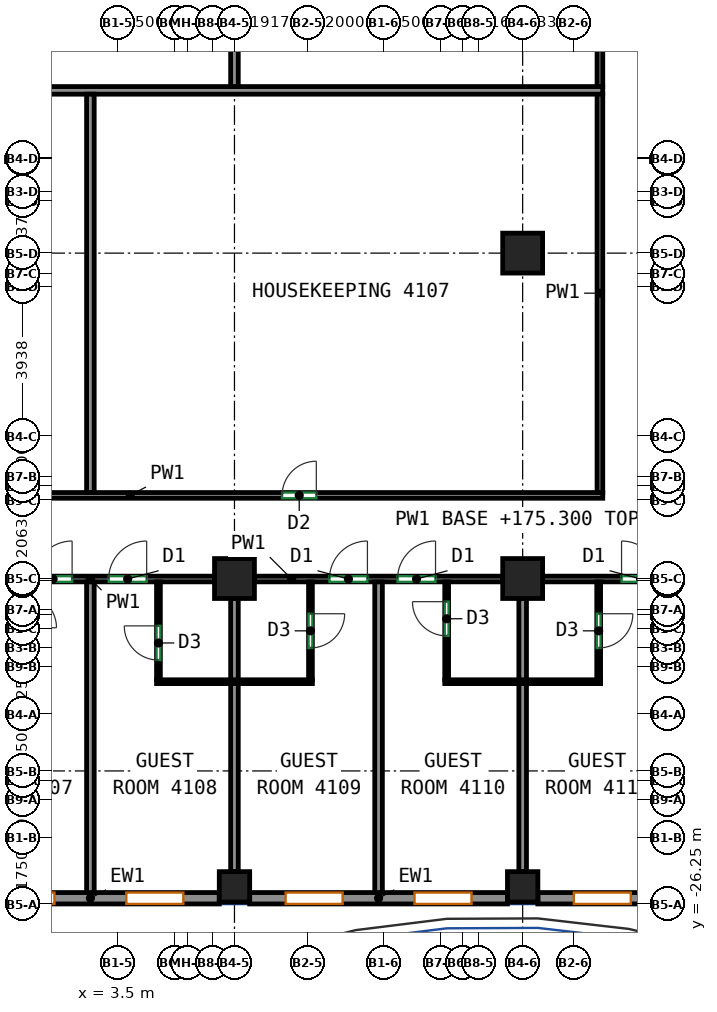
"""IFC4 building model, lengths in metres.
Left out: names, types, materials, properties, quantities, classifications, styles, units other than length and angle.
Written with IfcOpenShell. Run it as: python <this file> out.ifc"""

import sys

from ifc_helpers import new_model, si_unit, direction, frame, frame_2d, origin, origin_2d, place, context, subcontext, project, spatial, rectangle, extrude, source, transform, mapped, element, fill, save


model = new_model("IFC4")
c1 = context("Model", 3, precision=1e-05, world=origin(), true_north=direction((0.0, 1.0)))
c2 = subcontext(c1, "Body", "Model", "MODEL_VIEW")
j1 = project(units=[si_unit("LENGTHUNIT", "METRE"), si_unit("PLANEANGLEUNIT", "RADIAN")], contexts=[c1])
p1 = place(None, origin())
s1 = spatial("IfcSite", under=j1, at=p1, CompositionType="ELEMENT")
p2 = place(p1, origin())
s2 = spatial("IfcBuilding", under=s1, at=p2, CompositionType="ELEMENT")
p3 = place(p2, frame((0.0, 0.0, 175.3)))
s3 = spatial("IfcBuildingStorey", under=s2, at=p3, CompositionType="ELEMENT", Elevation=175.3)
m1 = source(origin(), c2, "Body", "SweptSolid", [
    extrude(rectangle(XDim=0.8, YDim=0.8, at=origin_2d()), origin(), (0.0, 0.0, 1.0), 3.12),
])
p4 = place(p3, frame((6.583, -25.8, 0.0), z_axis=(0.0, 0.0, 1.0), x_axis=(1.0, 0.0, 0.0)))
e1 = element("IfcColumn", 1, at=p4, inside=s3, PredefinedType="COLUMN", context=c2, shape_type="MappedRepresentation", body=[
    mapped(m1, transform((0.0, 0.0, 0.0))),
])
m2 = source(origin(), c2, "Body", "SweptSolid", [
    extrude(rectangle(XDim=1.05, YDim=1.05, at=origin_2d()), origin(), (0.0, 0.0, 1.0), 3.12),
])
p5 = place(p3, frame((6.583, -17.688, 0.0), z_axis=(0.0, 0.0, 1.0), x_axis=(1.0, 0.0, 0.0)))
e2 = element("IfcColumn", 2, at=p5, inside=s3, PredefinedType="COLUMN", context=c2, shape_type="MappedRepresentation", body=[
    mapped(m2, transform((0.0, 0.0, 0.0))),
])
p6 = place(p3, frame((14.167, -25.8, 0.0), z_axis=(0.0, 0.0, 1.0), x_axis=(1.0, 0.0, 0.0)))
e3 = element("IfcColumn", 3, at=p6, inside=s3, PredefinedType="COLUMN", context=c2, shape_type="MappedRepresentation", body=[
    mapped(m1, transform((0.0, 0.0, 0.0))),
])
for number, where, z_axis, x_axis in (
    (4, (14.167, -17.688, 0.0), (0.0, 0.0, 1.0), (1.0, 0.0, 0.0)),
    (5, (14.167, -9.125, 0.0), (0.0, 0.0, 1.0), (1.0, 0.0, 0.0)),
):
    element("IfcColumn", number, at=place(p3, frame(where, z_axis=z_axis, x_axis=x_axis)), inside=s3, PredefinedType="COLUMN", context=c2, shape_type="MappedRepresentation", body=[
        mapped(m2, transform((0.0, 0.0, 0.0))),
    ])
m3 = source(origin(), c2, "Body", "SweptSolid", [
    extrude(rectangle(XDim=6.783, YDim=0.3, at=frame_2d((3.392, 0.0))), origin(), (0.0, 0.0, 1.0), 3.12),
])
p7 = place(p3, frame((-0.6, -26.1, 0.0), z_axis=(0.0, 0.0, 1.0), x_axis=(1.0, 0.0, 0.0)))
e6 = element("IfcWall", 6, at=p7, inside=s3, PredefinedType="SOLIDWALL", context=c2, shape_type="MappedRepresentation", body=[
    mapped(m3, transform((0.0, 0.0, 0.0))),
])
p8 = place(p7, frame((0.946, 0.0, 0.85)))
e7 = element("IfcOpeningElement", 7, at=p8, cuts=e6, PredefinedType="OPENING", context=c2, shape_type="SweptSolid", body=[
    extrude(rectangle(XDim=1.5, YDim=1.95, at=frame_2d((0.75, 0.975))), frame((0.0, 0.16, 0.0), z_axis=(0.0, -1.0, 0.0), x_axis=(1.0, 0.0, 0.0)), (0.0, 0.0, 1.0), 0.32),
])
p9 = place(p7, frame((4.337, 0.0, 0.85)))
e8 = element("IfcOpeningElement", 8, at=p9, cuts=e6, PredefinedType="OPENING", context=c2, shape_type="SweptSolid", body=[
    extrude(rectangle(XDim=1.5, YDim=1.95, at=frame_2d((0.75, 0.975))), frame((0.0, 0.16, 0.0), z_axis=(0.0, -1.0, 0.0), x_axis=(1.0, 0.0, 0.0)), (0.0, 0.0, 1.0), 0.32),
])
m4 = source(origin(), c2, "Body", "SweptSolid", [
    extrude(rectangle(XDim=6.783, YDim=0.3, at=frame_2d((3.392, 0.0))), origin(), (0.0, 0.0, 1.0), 3.12),
])
p10 = place(p3, frame((6.983, -26.1, 0.0), z_axis=(0.0, 0.0, 1.0), x_axis=(1.0, 0.0, 0.0)))
e9 = element("IfcWall", 9, at=p10, inside=s3, PredefinedType="SOLIDWALL", context=c2, shape_type="MappedRepresentation", body=[
    mapped(m4, transform((0.0, 0.0, 0.0))),
])
p11 = place(p10, frame((0.946, 0.0, 0.85)))
e10 = element("IfcOpeningElement", 10, at=p11, cuts=e9, PredefinedType="OPENING", context=c2, shape_type="SweptSolid", body=[
    extrude(rectangle(XDim=1.5, YDim=1.95, at=frame_2d((0.75, 0.975))), frame((0.0, 0.16, 0.0), z_axis=(0.0, -1.0, 0.0), x_axis=(1.0, 0.0, 0.0)), (0.0, 0.0, 1.0), 0.32),
])
p12 = place(p10, frame((4.338, 0.0, 0.85)))
e11 = element("IfcOpeningElement", 11, at=p12, cuts=e9, PredefinedType="OPENING", context=c2, shape_type="SweptSolid", body=[
    extrude(rectangle(XDim=1.5, YDim=1.95, at=frame_2d((0.75, 0.975))), frame((0.0, 0.16, 0.0), z_axis=(0.0, -1.0, 0.0), x_axis=(1.0, 0.0, 0.0)), (0.0, 0.0, 1.0), 0.32),
])
p13 = place(p3, frame((14.567, -26.1, 0.0), z_axis=(0.0, 0.0, 1.0), x_axis=(1.0, 0.0, 0.0)))
e12 = element("IfcWall", 12, at=p13, inside=s3, PredefinedType="SOLIDWALL", context=c2, shape_type="MappedRepresentation", body=[
    mapped(m3, transform((0.0, 0.0, 0.0))),
])
p14 = place(p13, frame((0.946, 0.0, 0.85)))
e13 = element("IfcOpeningElement", 13, at=p14, cuts=e12, PredefinedType="OPENING", context=c2, shape_type="SweptSolid", body=[
    extrude(rectangle(XDim=1.5, YDim=1.95, at=frame_2d((0.75, 0.975))), frame((0.0, 0.16, 0.0), z_axis=(0.0, -1.0, 0.0), x_axis=(1.0, 0.0, 0.0)), (0.0, 0.0, 1.0), 0.32),
])
p15 = place(p13, frame((4.337, 0.0, 0.85)))
e14 = element("IfcOpeningElement", 14, at=p15, cuts=e12, PredefinedType="OPENING", context=c2, shape_type="SweptSolid", body=[
    extrude(rectangle(XDim=1.5, YDim=1.95, at=frame_2d((0.75, 0.975))), frame((0.0, 0.16, 0.0), z_axis=(0.0, -1.0, 0.0), x_axis=(1.0, 0.0, 0.0)), (0.0, 0.0, 1.0), 0.32),
])
p16 = place(p3, frame((-0.475, -17.7, 0.0), z_axis=(0.0, 0.0, 1.0), x_axis=(1.0, 0.0, 0.0)))
e15 = element("IfcWall", 15, at=p16, inside=s3, PredefinedType="PARTITIONING", context=c2, shape_type="SweptSolid", body=[
    extrude(rectangle(XDim=6.533, YDim=0.15, at=frame_2d((3.267, 0.0))), origin(), (0.0, 0.0, 1.0), 3.12),
])
p17 = place(p16, frame((1.786, 0.0, 0.0)))
e16 = element("IfcOpeningElement", 16, at=p17, cuts=e15, PredefinedType="OPENING", context=c2, shape_type="SweptSolid", body=[
    extrude(rectangle(XDim=1.0, YDim=2.1, at=frame_2d((0.5, 1.05))), frame((0.0, 0.085, 0.0), z_axis=(0.0, -1.0, 0.0), x_axis=(1.0, 0.0, 0.0)), (0.0, 0.0, 1.0), 0.17),
])
p18 = place(p16, frame((3.748, 0.0, 0.0)))
e17 = element("IfcOpeningElement", 17, at=p18, cuts=e15, PredefinedType="OPENING", context=c2, shape_type="SweptSolid", body=[
    extrude(rectangle(XDim=1.0, YDim=2.1, at=frame_2d((0.5, 1.05))), frame((0.0, 0.085, 0.0), z_axis=(0.0, -1.0, 0.0), x_axis=(1.0, 0.0, 0.0)), (0.0, 0.0, 1.0), 0.17),
])
p19 = place(p3, frame((7.108, -17.7, 0.0), z_axis=(0.0, 0.0, 1.0), x_axis=(1.0, 0.0, 0.0)))
e18 = element("IfcWall", 18, at=p19, inside=s3, PredefinedType="PARTITIONING", context=c2, shape_type="SweptSolid", body=[
    extrude(rectangle(XDim=6.534, YDim=0.15, at=frame_2d((3.267, 0.0))), origin(), (0.0, 0.0, 1.0), 3.12),
])
p20 = place(p19, frame((1.974, 0.0, 0.0)))
e19 = element("IfcOpeningElement", 19, at=p20, cuts=e18, PredefinedType="OPENING", context=c2, shape_type="SweptSolid", body=[
    extrude(rectangle(XDim=1.0, YDim=2.1, at=frame_2d((0.5, 1.05))), frame((0.0, 0.085, 0.0), z_axis=(0.0, -1.0, 0.0), x_axis=(1.0, 0.0, 0.0)), (0.0, 0.0, 1.0), 0.17),
])
p21 = place(p19, frame((3.766, 0.0, 0.0)))
e20 = element("IfcOpeningElement", 20, at=p21, cuts=e18, PredefinedType="OPENING", context=c2, shape_type="SweptSolid", body=[
    extrude(rectangle(XDim=1.0, YDim=2.1, at=frame_2d((0.5, 1.05))), frame((0.0, 0.085, 0.0), z_axis=(0.0, -1.0, 0.0), x_axis=(1.0, 0.0, 0.0)), (0.0, 0.0, 1.0), 0.17),
])
p22 = place(p3, frame((14.692, -17.7, 0.0), z_axis=(0.0, 0.0, 1.0), x_axis=(1.0, 0.0, 0.0)))
e21 = element("IfcWall", 21, at=p22, inside=s3, PredefinedType="PARTITIONING", context=c2, shape_type="SweptSolid", body=[
    extrude(rectangle(XDim=7.058, YDim=0.15, at=frame_2d((3.529, 0.0))), origin(), (0.0, 0.0, 1.0), 2.52),
])
p23 = place(p22, frame((2.077, 0.0, 0.0)))
e22 = element("IfcOpeningElement", 22, at=p23, cuts=e21, PredefinedType="OPENING", context=c2, shape_type="SweptSolid", body=[
    extrude(rectangle(XDim=1.0, YDim=2.1, at=frame_2d((0.5, 1.05))), frame((0.0, 0.085, 0.0), z_axis=(0.0, -1.0, 0.0), x_axis=(1.0, 0.0, 0.0)), (0.0, 0.0, 1.0), 0.17),
])
p24 = place(p22, frame((5.657, 0.0, 0.0)))
e23 = element("IfcOpeningElement", 23, at=p24, cuts=e21, PredefinedType="OPENING", context=c2, shape_type="SweptSolid", body=[
    extrude(rectangle(XDim=1.0, YDim=2.1, at=frame_2d((0.5, 1.05))), frame((0.0, 0.085, 0.0), z_axis=(0.0, -1.0, 0.0), x_axis=(1.0, 0.0, 0.0)), (0.0, 0.0, 1.0), 0.17),
])
p25 = place(p3, frame((16.2, -4.753, 0.0), z_axis=(0.0, 0.0, 1.0), x_axis=(0.0, 1.0, 0.0)))
e24 = element("IfcWall", 24, at=p25, inside=s3, PredefinedType="PARTITIONING", context=c2, shape_type="SweptSolid", body=[
    extrude(rectangle(XDim=8.378, YDim=0.15, at=frame_2d((4.189, 0.0))), origin(), (0.0, 0.0, 1.0), 3.12),
])
p26 = place(p3, frame((-8.593, -15.5, 0.0), z_axis=(0.0, 0.0, 1.0), x_axis=(1.0, 0.0, 0.0)))
e25 = element("IfcWall", 25, at=p26, inside=s3, PredefinedType="PARTITIONING", context=c2, shape_type="SweptSolid", body=[
    extrude(rectangle(XDim=24.868, YDim=0.15, at=frame_2d((12.434, 0.0))), origin(), (0.0, 0.0, 1.0), 3.12),
])
p27 = place(p26, frame((6.44, 0.0, 0.0)))
e26 = element("IfcOpeningElement", 26, at=p27, cuts=e25, PredefinedType="OPENING", context=c2, shape_type="SweptSolid", body=[
    extrude(rectangle(XDim=0.9, YDim=2.1, at=frame_2d((0.45, 1.05))), frame((0.0, 0.085, 0.0), z_axis=(0.0, -1.0, 0.0), x_axis=(1.0, 0.0, 0.0)), (0.0, 0.0, 1.0), 0.17),
])
p28 = place(p26, frame((16.43, 0.0, 0.0)))
e27 = element("IfcOpeningElement", 27, at=p28, cuts=e25, PredefinedType="OPENING", context=c2, shape_type="SweptSolid", body=[
    extrude(rectangle(XDim=0.9, YDim=2.1, at=frame_2d((0.45, 1.05))), frame((0.0, 0.085, 0.0), z_axis=(0.0, -1.0, 0.0), x_axis=(1.0, 0.0, 0.0)), (0.0, 0.0, 1.0), 0.17),
])
p29 = place(p3, frame((16.2, -15.425, 0.0), z_axis=(0.0, 0.0, 1.0), x_axis=(0.0, 1.0, 0.0)))
e28 = element("IfcWall", 28, at=p29, inside=s3, PredefinedType="PARTITIONING", context=c2, shape_type="SweptSolid", body=[
    extrude(rectangle(XDim=10.492, YDim=0.15, at=frame_2d((5.246, 0.0))), origin(), (0.0, 0.0, 1.0), 3.12),
])
p30 = place(p3, frame((2.792, -26.0, 0.0), z_axis=(0.0, 0.0, 1.0), x_axis=(0.0, 1.0, 0.0)))
e29 = element("IfcWall", 29, at=p30, inside=s3, PredefinedType="PARTITIONING", context=c2, shape_type="SweptSolid", body=[
    extrude(rectangle(XDim=8.223, YDim=0.2, at=frame_2d((4.111, 0.0))), origin(), (0.0, 0.0, 1.0), 3.12),
])
p31 = place(p3, frame((4.583, -20.352, 0.0), z_axis=(0.0, 0.0, 1.0), x_axis=(0.0, 1.0, 0.0)))
e30 = element("IfcWall", 30, at=p31, inside=s3, PredefinedType="PARTITIONING", context=c2, shape_type="SweptSolid", body=[
    extrude(rectangle(XDim=2.575, YDim=0.1, at=frame_2d((1.288, 0.0))), origin(), (0.0, 0.0, 1.0), 3.12),
])
p32 = place(p31, frame((0.519, 0.0, 0.0)))
e31 = element("IfcOpeningElement", 31, at=p32, cuts=e30, PredefinedType="OPENING", context=c2, shape_type="SweptSolid", body=[
    extrude(rectangle(XDim=0.9, YDim=2.1, at=frame_2d((0.45, 1.05))), frame((0.0, 0.06, 0.0), z_axis=(0.0, -1.0, 0.0), x_axis=(1.0, 0.0, 0.0)), (0.0, 0.0, 1.0), 0.12),
])
p33 = place(p3, frame((4.533, -20.402, 0.0), z_axis=(0.0, 0.0, 1.0), x_axis=(1.0, 0.0, 0.0)))
e32 = element("IfcWall", 32, at=p33, inside=s3, PredefinedType="PARTITIONING", context=c2, shape_type="SweptSolid", body=[
    extrude(rectangle(XDim=4.1, YDim=0.1, at=frame_2d((2.05, 0.0))), origin(), (0.0, 0.0, 1.0), 3.12),
])
p34 = place(p3, frame((6.583, -25.4, 0.0), z_axis=(0.0, 0.0, 1.0), x_axis=(0.0, 1.0, 0.0)))
e33 = element("IfcWall", 33, at=p34, inside=s3, PredefinedType="PARTITIONING", context=c2, shape_type="SweptSolid", body=[
    extrude(rectangle(XDim=4.948, YDim=0.2, at=frame_2d((2.474, 0.0))), origin(), (0.0, 0.0, 1.0), 3.12),
])
p35 = place(p3, frame((6.583, -20.352, 0.0), z_axis=(0.0, 0.0, 1.0), x_axis=(0.0, 1.0, 0.0)))
e34 = element("IfcWall", 34, at=p35, inside=s3, PredefinedType="PARTITIONING", context=c2, shape_type="SweptSolid", body=[
    extrude(rectangle(XDim=2.14, YDim=0.2, at=frame_2d((1.07, 0.0))), origin(), (0.0, 0.0, 1.0), 3.12),
])
p36 = place(p3, frame((8.583, -17.777, 0.0), z_axis=(0.0, 0.0, 1.0), x_axis=(0.0, -1.0, 0.0)))
e35 = element("IfcWall", 35, at=p36, inside=s3, PredefinedType="PARTITIONING", context=c2, shape_type="SweptSolid", body=[
    extrude(rectangle(XDim=2.575, YDim=0.1, at=frame_2d((1.288, 0.0))), origin(), (0.0, 0.0, 1.0), 3.12),
])
p37 = place(p36, frame((0.837, 0.0, 0.0)))
e36 = element("IfcOpeningElement", 36, at=p37, cuts=e35, PredefinedType="OPENING", context=c2, shape_type="SweptSolid", body=[
    extrude(rectangle(XDim=0.9, YDim=2.1, at=frame_2d((0.45, 1.05))), frame((0.0, 0.06, 0.0), z_axis=(0.0, -1.0, 0.0), x_axis=(1.0, 0.0, 0.0)), (0.0, 0.0, 1.0), 0.12),
])
p38 = place(p3, frame((10.375, -26.0, 0.0), z_axis=(0.0, 0.0, 1.0), x_axis=(0.0, 1.0, 0.0)))
e37 = element("IfcWall", 37, at=p38, inside=s3, PredefinedType="PARTITIONING", context=c2, shape_type="SweptSolid", body=[
    extrude(rectangle(XDim=8.223, YDim=0.2, at=frame_2d((4.111, 0.0))), origin(), (0.0, 0.0, 1.0), 3.12),
])
p39 = place(p3, frame((12.167, -20.352, 0.0), z_axis=(0.0, 0.0, 1.0), x_axis=(0.0, 1.0, 0.0)))
e38 = element("IfcWall", 38, at=p39, inside=s3, PredefinedType="PARTITIONING", context=c2, shape_type="SweptSolid", body=[
    extrude(rectangle(XDim=2.575, YDim=0.1, at=frame_2d((1.288, 0.0))), origin(), (0.0, 0.0, 1.0), 3.12),
])
p40 = place(p39, frame((1.156, 0.0, 0.0)))
e39 = element("IfcOpeningElement", 39, at=p40, cuts=e38, PredefinedType="OPENING", context=c2, shape_type="SweptSolid", body=[
    extrude(rectangle(XDim=0.9, YDim=2.1, at=frame_2d((0.45, 1.05))), frame((0.0, 0.06, 0.0), z_axis=(0.0, -1.0, 0.0), x_axis=(1.0, 0.0, 0.0)), (0.0, 0.0, 1.0), 0.12),
])
p41 = place(p3, frame((12.117, -20.402, 0.0), z_axis=(0.0, 0.0, 1.0), x_axis=(1.0, 0.0, 0.0)))
e40 = element("IfcWall", 40, at=p41, inside=s3, PredefinedType="PARTITIONING", context=c2, shape_type="SweptSolid", body=[
    extrude(rectangle(XDim=4.1, YDim=0.1, at=frame_2d((2.05, 0.0))), origin(), (0.0, 0.0, 1.0), 3.12),
])
p42 = place(p3, frame((14.167, -25.4, 0.0), z_axis=(0.0, 0.0, 1.0), x_axis=(0.0, 1.0, 0.0)))
e41 = element("IfcWall", 41, at=p42, inside=s3, PredefinedType="PARTITIONING", context=c2, shape_type="SweptSolid", body=[
    extrude(rectangle(XDim=4.948, YDim=0.2, at=frame_2d((2.474, 0.0))), origin(), (0.0, 0.0, 1.0), 3.12),
])
p43 = place(p3, frame((14.167, -20.352, 0.0), z_axis=(0.0, 0.0, 1.0), x_axis=(0.0, 1.0, 0.0)))
e42 = element("IfcWall", 42, at=p43, inside=s3, PredefinedType="PARTITIONING", context=c2, shape_type="SweptSolid", body=[
    extrude(rectangle(XDim=2.14, YDim=0.2, at=frame_2d((1.07, 0.0))), origin(), (0.0, 0.0, 1.0), 3.12),
])
p44 = place(p3, frame((16.167, -17.777, 0.0), z_axis=(0.0, 0.0, 1.0), x_axis=(0.0, -1.0, 0.0)))
e43 = element("IfcWall", 43, at=p44, inside=s3, PredefinedType="PARTITIONING", context=c2, shape_type="SweptSolid", body=[
    extrude(rectangle(XDim=2.575, YDim=0.1, at=frame_2d((1.288, 0.0))), origin(), (0.0, 0.0, 1.0), 3.12),
])
p45 = place(p44, frame((0.837, 0.0, 0.0)))
e44 = element("IfcOpeningElement", 44, at=p45, cuts=e43, PredefinedType="OPENING", context=c2, shape_type="SweptSolid", body=[
    extrude(rectangle(XDim=0.9, YDim=2.1, at=frame_2d((0.45, 1.05))), frame((0.0, 0.06, 0.0), z_axis=(0.0, -1.0, 0.0), x_axis=(1.0, 0.0, 0.0)), (0.0, 0.0, 1.0), 0.12),
])
p46 = place(p3, frame((-13.873, -4.843, 0.0), z_axis=(0.0, 0.0, 1.0), x_axis=(1.0, 0.0, 0.0)))
e45 = element("IfcWall", 45, at=p46, inside=s3, PredefinedType="PARTITIONING", context=c2, shape_type="SweptSolid", body=[
    extrude(rectangle(XDim=30.146, YDim=0.2, at=frame_2d((15.073, 0.0))), origin(), (0.0, 0.0, 1.0), 3.12),
])
p47 = place(p3, frame((6.583, -4.743, 0.0), z_axis=(0.0, 0.0, 1.0), x_axis=(0.0, 1.0, 0.0)))
e46 = element("IfcWall", 46, at=p47, inside=s3, PredefinedType="PARTITIONING", context=c2, shape_type="SweptSolid", body=[
    extrude(rectangle(XDim=8.366, YDim=0.2, at=frame_2d((4.183, 0.0))), origin(), (0.0, 0.0, 1.0), 3.12),
])
p48 = place(p3, frame((2.792, -15.423, 0.0), z_axis=(0.0, 0.0, 1.0), x_axis=(0.0, 1.0, 0.0)))
e47 = element("IfcWall", 47, at=p48, inside=s3, PredefinedType="PARTITIONING", context=c2, shape_type="SweptSolid", body=[
    extrude(rectangle(XDim=10.48, YDim=0.2, at=frame_2d((5.24, 0.0))), origin(), (0.0, 0.0, 1.0), 3.12),
])
p49 = place(p8, origin())
e48 = element("IfcWindow", 48, at=p49, inside=s3, PartitioningType="SINGLE_PANEL", PredefinedType="WINDOW", context=c2, shape_type="SweptSolid", body=[
    extrude(rectangle(XDim=1.5, YDim=1.95, at=frame_2d((0.75, 0.975))), frame((0.0, 0.03, 0.0), z_axis=(0.0, -1.0, 0.0), x_axis=(1.0, 0.0, 0.0)), (0.0, 0.0, 1.0), 0.06),
])
fill(e7, e48)
p50 = place(p9, origin())
e49 = element("IfcWindow", 49, at=p50, inside=s3, PartitioningType="SINGLE_PANEL", PredefinedType="WINDOW", context=c2, shape_type="SweptSolid", body=[
    extrude(rectangle(XDim=1.5, YDim=1.95, at=frame_2d((0.75, 0.975))), frame((0.0, 0.03, 0.0), z_axis=(0.0, -1.0, 0.0), x_axis=(1.0, 0.0, 0.0)), (0.0, 0.0, 1.0), 0.06),
])
fill(e8, e49)
p51 = place(p11, origin())
e50 = element("IfcWindow", 50, at=p51, inside=s3, PartitioningType="SINGLE_PANEL", PredefinedType="WINDOW", context=c2, shape_type="SweptSolid", body=[
    extrude(rectangle(XDim=1.5, YDim=1.95, at=frame_2d((0.75, 0.975))), frame((0.0, 0.03, 0.0), z_axis=(0.0, -1.0, 0.0), x_axis=(1.0, 0.0, 0.0)), (0.0, 0.0, 1.0), 0.06),
])
fill(e10, e50)
p52 = place(p12, origin())
e51 = element("IfcWindow", 51, at=p52, inside=s3, PartitioningType="SINGLE_PANEL", PredefinedType="WINDOW", context=c2, shape_type="SweptSolid", body=[
    extrude(rectangle(XDim=1.5, YDim=1.95, at=frame_2d((0.75, 0.975))), frame((0.0, 0.03, 0.0), z_axis=(0.0, -1.0, 0.0), x_axis=(1.0, 0.0, 0.0)), (0.0, 0.0, 1.0), 0.06),
])
fill(e11, e51)
p53 = place(p14, origin())
e52 = element("IfcWindow", 52, at=p53, inside=s3, PartitioningType="SINGLE_PANEL", PredefinedType="WINDOW", context=c2, shape_type="SweptSolid", body=[
    extrude(rectangle(XDim=1.5, YDim=1.95, at=frame_2d((0.75, 0.975))), frame((0.0, 0.03, 0.0), z_axis=(0.0, -1.0, 0.0), x_axis=(1.0, 0.0, 0.0)), (0.0, 0.0, 1.0), 0.06),
])
fill(e13, e52)
p54 = place(p32, origin())
e53 = element("IfcDoor", 53, at=p54, inside=s3, OperationType="SINGLE_SWING_RIGHT", PredefinedType="DOOR", context=c2, shape_type="SweptSolid", body=[
    extrude(rectangle(XDim=0.9, YDim=2.1, at=frame_2d((0.45, 1.05))), frame((0.0, 0.025, 0.0), z_axis=(0.0, -1.0, 0.0), x_axis=(1.0, 0.0, 0.0)), (0.0, 0.0, 1.0), 0.05),
])
fill(e31, e53)
p55 = place(p37, origin())
e54 = element("IfcDoor", 54, at=p55, inside=s3, OperationType="SINGLE_SWING_LEFT", PredefinedType="DOOR", context=c2, shape_type="SweptSolid", body=[
    extrude(rectangle(XDim=0.9, YDim=2.1, at=frame_2d((0.45, 1.05))), frame((0.0, 0.025, 0.0), z_axis=(0.0, -1.0, 0.0), x_axis=(1.0, 0.0, 0.0)), (0.0, 0.0, 1.0), 0.05),
])
fill(e36, e54)
p56 = place(p45, origin())
e55 = element("IfcDoor", 55, at=p56, inside=s3, OperationType="SINGLE_SWING_LEFT", PredefinedType="DOOR", context=c2, shape_type="SweptSolid", body=[
    extrude(rectangle(XDim=0.9, YDim=2.1, at=frame_2d((0.45, 1.05))), frame((0.0, 0.025, 0.0), z_axis=(0.0, -1.0, 0.0), x_axis=(1.0, 0.0, 0.0)), (0.0, 0.0, 1.0), 0.05),
])
fill(e44, e55)
p57 = place(p40, origin())
e56 = element("IfcDoor", 56, at=p57, inside=s3, OperationType="SINGLE_SWING_RIGHT", PredefinedType="DOOR", context=c2, shape_type="SweptSolid", body=[
    extrude(rectangle(XDim=0.9, YDim=2.1, at=frame_2d((0.45, 1.05))), frame((0.0, 0.025, 0.0), z_axis=(0.0, -1.0, 0.0), x_axis=(1.0, 0.0, 0.0)), (0.0, 0.0, 1.0), 0.05),
])
fill(e39, e56)
p58 = place(p17, origin())
e57 = element("IfcDoor", 57, at=p58, inside=s3, OperationType="SINGLE_SWING_RIGHT", PredefinedType="DOOR", context=c2, shape_type="SweptSolid", body=[
    extrude(rectangle(XDim=1.0, YDim=2.1, at=frame_2d((0.5, 1.05))), frame((0.0, 0.025, 0.0), z_axis=(0.0, -1.0, 0.0), x_axis=(1.0, 0.0, 0.0)), (0.0, 0.0, 1.0), 0.05),
])
fill(e16, e57)
p59 = place(p18, origin())
e58 = element("IfcDoor", 58, at=p59, inside=s3, OperationType="SINGLE_SWING_RIGHT", PredefinedType="DOOR", context=c2, shape_type="SweptSolid", body=[
    extrude(rectangle(XDim=1.0, YDim=2.1, at=frame_2d((0.5, 1.05))), frame((0.0, 0.025, 0.0), z_axis=(0.0, -1.0, 0.0), x_axis=(1.0, 0.0, 0.0)), (0.0, 0.0, 1.0), 0.05),
])
fill(e17, e58)
p60 = place(p20, origin())
e59 = element("IfcDoor", 59, at=p60, inside=s3, OperationType="SINGLE_SWING_RIGHT", PredefinedType="DOOR", context=c2, shape_type="SweptSolid", body=[
    extrude(rectangle(XDim=1.0, YDim=2.1, at=frame_2d((0.5, 1.05))), frame((0.0, 0.025, 0.0), z_axis=(0.0, -1.0, 0.0), x_axis=(1.0, 0.0, 0.0)), (0.0, 0.0, 1.0), 0.05),
])
fill(e19, e59)
p61 = place(p21, origin())
e60 = element("IfcDoor", 60, at=p61, inside=s3, OperationType="SINGLE_SWING_RIGHT", PredefinedType="DOOR", context=c2, shape_type="SweptSolid", body=[
    extrude(rectangle(XDim=1.0, YDim=2.1, at=frame_2d((0.5, 1.05))), frame((0.0, 0.025, 0.0), z_axis=(0.0, -1.0, 0.0), x_axis=(1.0, 0.0, 0.0)), (0.0, 0.0, 1.0), 0.05),
])
fill(e20, e60)
p62 = place(p23, origin())
e61 = element("IfcDoor", 61, at=p62, inside=s3, OperationType="SINGLE_SWING_LEFT", PredefinedType="DOOR", context=c2, shape_type="SweptSolid", body=[
    extrude(rectangle(XDim=1.0, YDim=2.1, at=frame_2d((0.5, 1.05))), frame((0.0, 0.025, 0.0), z_axis=(0.0, -1.0, 0.0), x_axis=(1.0, 0.0, 0.0)), (0.0, 0.0, 1.0), 0.05),
])
fill(e22, e61)
p63 = place(p28, origin())
e62 = element("IfcDoor", 62, at=p63, inside=s3, OperationType="SINGLE_SWING_RIGHT", PredefinedType="DOOR", context=c2, shape_type="SweptSolid", body=[
    extrude(rectangle(XDim=0.9, YDim=2.1, at=frame_2d((0.45, 1.05))), frame((0.0, 0.025, 0.0), z_axis=(0.0, -1.0, 0.0), x_axis=(1.0, 0.0, 0.0)), (0.0, 0.0, 1.0), 0.05),
])
fill(e27, e62)
save(model, sys.argv[1])
